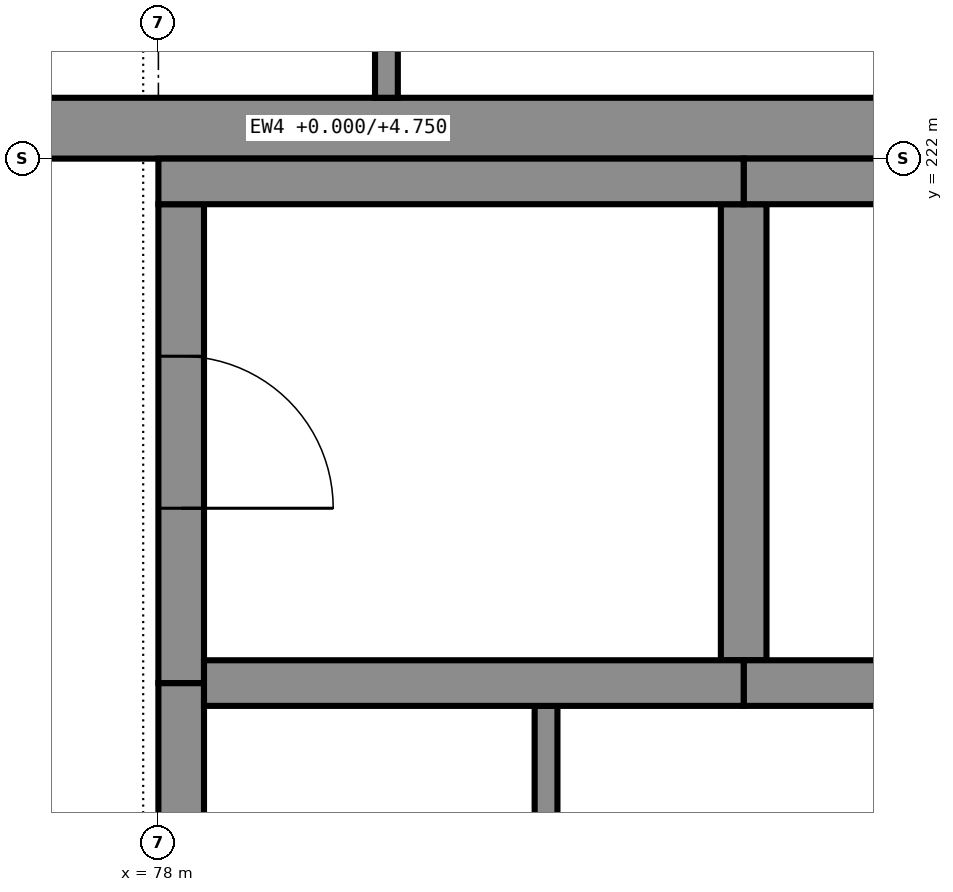
"""IFC4 building model, lengths in metres.
Left out: names, types, materials, properties, quantities, classifications, styles, units other than length and angle.
Written with IfcOpenShell. Run it as: python <this file> out.ifc"""

import sys

from ifc_helpers import new_model, si_unit, direction, frame, frame_2d, origin, place, context, subcontext, project, spatial, rectangle, extrude, element, fill, save


model = new_model("IFC4")
c1 = context("Model", 3, precision=1e-05, world=origin(), true_north=direction((0.0, 1.0)))
c2 = subcontext(c1, "Body", "Model", "MODEL_VIEW")
j1 = project(units=[si_unit("LENGTHUNIT", "METRE"), si_unit("PLANEANGLEUNIT", "RADIAN")], contexts=[c1])
p1 = place(None, origin())
s1 = spatial("IfcSite", under=j1, at=p1, CompositionType="ELEMENT")
p2 = place(p1, origin())
s2 = spatial("IfcBuilding", under=s1, at=p2, CompositionType="ELEMENT")
p3 = place(p2, origin())
s3 = spatial("IfcBuildingStorey", under=s2, at=p3, CompositionType="ELEMENT", Elevation=0.0)
p4 = place(p3, frame((90.0, 221.85, 0.0), z_axis=(0.0, 0.0, 1.0), x_axis=(-1.0, 0.0, 0.0)))
e1 = element("IfcWall", 1, at=p4, inside=s3, PredefinedType="SHEAR", context=c2, shape_type="SweptSolid", body=[
    extrude(rectangle(XDim=8.15, YDim=0.3, at=frame_2d((4.075, 0.0))), origin(), (0.0, 0.0, 1.0), 5.75),
])
p5 = place(p3, frame((81.85, 221.85, 0.0), z_axis=(0.0, 0.0, 1.0), x_axis=(-1.0, 0.0, 0.0)))
e2 = element("IfcWall", 2, at=p5, inside=s3, PredefinedType="SHEAR", context=c2, shape_type="SweptSolid", body=[
    extrude(rectangle(XDim=3.85, YDim=0.3, at=frame_2d((1.925, 0.0))), origin(), (0.0, 0.0, 1.0), 5.75),
])
p6 = place(p3, frame((89.7, 218.55, 0.0), z_axis=(0.0, 0.0, 1.0), x_axis=(-1.0, 0.0, 0.0)))
e3 = element("IfcWall", 3, at=p6, inside=s3, PredefinedType="SHEAR", context=c2, shape_type="SweptSolid", body=[
    extrude(rectangle(XDim=7.85, YDim=0.3, at=frame_2d((3.925, 0.0))), origin(), (0.0, 0.0, 1.0), 5.75),
])
p7 = place(p6, frame((0.5, 0.0, 0.0)))
e4 = element("IfcOpeningElement", 4, at=p7, cuts=e3, PredefinedType="OPENING", context=c2, shape_type="SweptSolid", body=[
    extrude(rectangle(XDim=1.0, YDim=2.1, at=frame_2d((0.5, 1.05))), frame((0.0, 0.16, 0.0), z_axis=(0.0, -1.0, 0.0), x_axis=(1.0, 0.0, 0.0)), (0.0, 0.0, 1.0), 0.32),
])
p8 = place(p3, frame((81.85, 218.55, 0.0), z_axis=(0.0, 0.0, 1.0), x_axis=(-1.0, 0.0, 0.0)))
e5 = element("IfcWall", 5, at=p8, inside=s3, PredefinedType="SHEAR", context=c2, shape_type="SweptSolid", body=[
    extrude(rectangle(XDim=3.55, YDim=0.3, at=frame_2d((1.775, 0.0))), origin(), (0.0, 0.0, 1.0), 5.75),
])
p9 = place(p3, frame((78.15, 213.45, 0.0), z_axis=(0.0, 0.0, 1.0), x_axis=(0.0, 1.0, 0.0)))
e6 = element("IfcWall", 6, at=p9, inside=s3, PredefinedType="SHEAR", context=c2, shape_type="SweptSolid", body=[
    extrude(rectangle(XDim=5.1, YDim=0.3, at=frame_2d((2.55, 0.0))), origin(), (0.0, 0.0, 1.0), 5.75),
])
p10 = place(p9, frame((0.3, 0.0, 0.0)))
e7 = element("IfcOpeningElement", 7, at=p10, cuts=e6, PredefinedType="OPENING", context=c2, shape_type="SweptSolid", body=[
    extrude(rectangle(XDim=1.5, YDim=2.1, at=frame_2d((0.75, 1.05))), frame((0.0, 0.16, 0.0), z_axis=(0.0, -1.0, 0.0), x_axis=(1.0, 0.0, 0.0)), (0.0, 0.0, 1.0), 0.32),
])
p11 = place(p3, frame((78.15, 218.55, 0.0), z_axis=(0.0, 0.0, 1.0), x_axis=(0.0, 1.0, 0.0)))
e8 = element("IfcWall", 8, at=p11, inside=s3, PredefinedType="SHEAR", context=c2, shape_type="SweptSolid", body=[
    extrude(rectangle(XDim=3.15, YDim=0.3, at=frame_2d((1.575, 0.0))), origin(), (0.0, 0.0, 1.0), 5.75),
])
p12 = place(p11, frame((1.15, 0.0, 0.0)))
e9 = element("IfcOpeningElement", 9, at=p12, cuts=e8, PredefinedType="OPENING", context=c2, shape_type="SweptSolid", body=[
    extrude(rectangle(XDim=1.0, YDim=2.1, at=frame_2d((0.5, 1.05))), frame((0.0, 0.16, 0.0), z_axis=(0.0, -1.0, 0.0), x_axis=(1.0, 0.0, 0.0)), (0.0, 0.0, 1.0), 0.32),
])
p13 = place(p3, frame((81.85, 218.7, 0.0), z_axis=(0.0, 0.0, 1.0), x_axis=(0.0, 1.0, 0.0)))
e10 = element("IfcWall", 10, at=p13, inside=s3, PredefinedType="SHEAR", context=c2, shape_type="SweptSolid", body=[
    extrude(rectangle(XDim=3.0, YDim=0.3, at=frame_2d((1.5, 0.0))), origin(), (0.0, 0.0, 1.0), 5.75),
])
p14 = place(p3, frame((66.5, 222.2, 0.0), z_axis=(0.0, 0.0, 1.0), x_axis=(1.0, 0.0, 0.0)))
e11 = element("IfcWall", 11, at=p14, inside=s3, PredefinedType="SOLIDWALL", context=c2, shape_type="SweptSolid", body=[
    extrude(rectangle(XDim=23.5, YDim=0.4, at=frame_2d((11.75, 0.0))), origin(), (0.0, 0.0, 1.0), 4.75),
])
p15 = place(p14, frame((4.6, 0.0, 0.0)))
e12 = element("IfcOpeningElement", 12, at=p15, cuts=e11, PredefinedType="OPENING", context=c2, shape_type="SweptSolid", body=[
    extrude(rectangle(XDim=1.8, YDim=2.1, at=frame_2d((0.9, 1.05))), frame((0.0, 0.21, 0.0), z_axis=(0.0, -1.0, 0.0), x_axis=(1.0, 0.0, 0.0)), (0.0, 0.0, 1.0), 0.42),
])
p16 = place(p3, frame((80.55, 215.65, 0.0), z_axis=(0.0, 0.0, 1.0), x_axis=(0.0, 1.0, 0.0)))
e13 = element("IfcWall", 13, at=p16, inside=s3, PredefinedType="PARTITIONING", context=c2, shape_type="SweptSolid", body=[
    extrude(rectangle(XDim=2.75, YDim=0.15, at=frame_2d((1.375, 0.0))), origin(), (0.0, 0.0, 1.0), 5.75),
])
p17 = place(p3, frame((79.5, 222.4, 0.0), z_axis=(0.0, 0.0, 1.0), x_axis=(0.0, 1.0, 0.0)))
e14 = element("IfcWall", 14, at=p17, inside=s3, PredefinedType="PARTITIONING", context=c2, shape_type="SweptSolid", body=[
    extrude(rectangle(XDim=7.225, YDim=0.15, at=frame_2d((3.613, 0.0))), origin(), (0.0, 0.0, 1.0), 5.75),
])
p18 = place(p12, frame((1.0, 0.0, 0.0), z_axis=(0.0, 0.0, 1.0), x_axis=(-1.0, 0.0, 0.0)))
e15 = element("IfcDoor", 15, at=p18, inside=s3, OperationType="SINGLE_SWING_LEFT", PredefinedType="DOOR", context=c2, shape_type="SweptSolid", body=[
    extrude(rectangle(XDim=1.0, YDim=2.1, at=frame_2d((0.5, 1.05))), frame((0.0, 0.025, 0.0), z_axis=(0.0, -1.0, 0.0), x_axis=(1.0, 0.0, 0.0)), (0.0, 0.0, 1.0), 0.05),
])
fill(e9, e15)
save(model, sys.argv[1])
